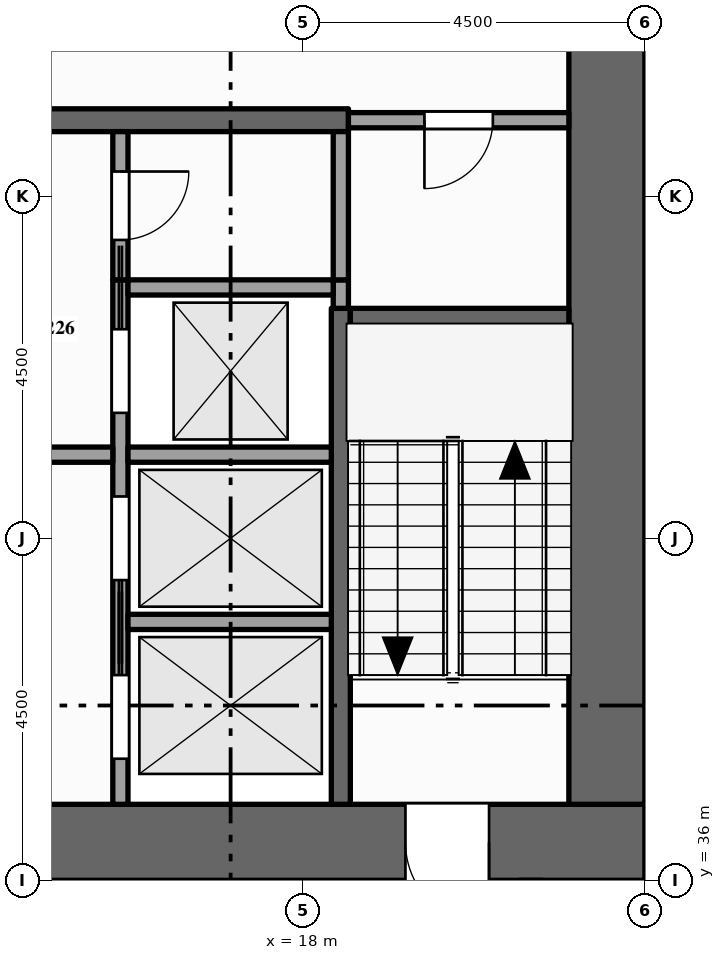
"""IFC4 building model, lengths in metres.
Left out: names, types, materials, properties, quantities, classifications, styles, units other than length and angle.
Written with IfcOpenShell. Run it as: python <this file> out.ifc"""

import sys

from ifc_helpers import new_model, si_unit, direction, frame, frame_2d, origin, place, context, subcontext, project, spatial, rectangle, extrude, element, fill, save


model = new_model("IFC4")
c1 = context("Model", 3, precision=1e-05, world=origin(), true_north=direction((0.0, 1.0)))
c2 = subcontext(c1, "Body", "Model", "MODEL_VIEW")
j1 = project(units=[si_unit("LENGTHUNIT", "METRE"), si_unit("PLANEANGLEUNIT", "RADIAN")], contexts=[c1])
p1 = place(None, origin())
s1 = spatial("IfcSite", under=j1, at=p1, CompositionType="ELEMENT")
p2 = place(p1, origin())
s2 = spatial("IfcBuilding", under=s1, at=p2, CompositionType="ELEMENT")
p3 = place(p2, frame((0.0, 0.0, 143.0)))
s3 = spatial("IfcBuildingStorey", under=s2, at=p3, CompositionType="ELEMENT", Elevation=143.0)
p4 = place(p3, frame((0.0, 36.5, -0.15), z_axis=(0.0, 0.0, 1.0), x_axis=(1.0, 0.0, 0.0)))
e1 = element("IfcWall", 1, at=p4, inside=s3, PredefinedType="SHEAR", context=c2, shape_type="SweptSolid", body=[
    extrude(rectangle(XDim=22.5, YDim=1.0, at=frame_2d((11.25, 0.0))), origin(), (0.0, 0.0, 1.0), 4.0),
])
p5 = place(p4, frame((7.1, 0.0, 0.15)))
e2 = element("IfcOpeningElement", 2, at=p5, cuts=e1, PredefinedType="OPENING", context=c2, shape_type="SweptSolid", body=[
    extrude(rectangle(XDim=1.8, YDim=2.1, at=frame_2d((0.9, 1.05))), frame((0.0, 0.51, 0.0), z_axis=(0.0, -1.0, 0.0), x_axis=(1.0, 0.0, 0.0)), (0.0, 0.0, 1.0), 1.02),
])
p6 = place(p4, frame((13.15, 0.0, 0.15)))
e3 = element("IfcOpeningElement", 3, at=p6, cuts=e1, PredefinedType="OPENING", context=c2, shape_type="SweptSolid", body=[
    extrude(rectangle(XDim=1.1, YDim=2.1, at=frame_2d((0.55, 1.05))), frame((0.0, 0.51, 0.0), z_axis=(0.0, -1.0, 0.0), x_axis=(1.0, 0.0, 0.0)), (0.0, 0.0, 1.0), 1.02),
])
p7 = place(p4, frame((2.15, 0.0, 0.15)))
e4 = element("IfcOpeningElement", 4, at=p7, cuts=e1, PredefinedType="OPENING", context=c2, shape_type="SweptSolid", body=[
    extrude(rectangle(XDim=1.1, YDim=2.1, at=frame_2d((0.55, 1.05))), frame((0.0, 0.51, 0.0), z_axis=(0.0, -1.0, 0.0), x_axis=(1.0, 0.0, 0.0)), (0.0, 0.0, 1.0), 1.02),
])
p8 = place(p4, frame((19.35, 0.0, 0.15)))
e5 = element("IfcOpeningElement", 5, at=p8, cuts=e1, PredefinedType="OPENING", context=c2, shape_type="SweptSolid", body=[
    extrude(rectangle(XDim=1.1, YDim=2.1, at=frame_2d((0.55, 1.05))), frame((0.0, 0.51, 0.0), z_axis=(0.0, -1.0, 0.0), x_axis=(1.0, 0.0, 0.0)), (0.0, 0.0, 1.0), 1.02),
])
p9 = place(p3, frame((22.0, 37.0, -0.15), z_axis=(0.0, 0.0, 1.0), x_axis=(0.0, 1.0, 0.0)))
e6 = element("IfcWall", 6, at=p9, inside=s3, PredefinedType="SHEAR", context=c2, shape_type="SweptSolid", body=[
    extrude(rectangle(XDim=11.5, YDim=1.0, at=frame_2d((5.75, 0.0))), origin(), (0.0, 0.0, 1.0), 4.0),
])
p10 = place(p3, frame((15.6, 37.0, 0.0), z_axis=(0.0, 0.0, 1.0), x_axis=(0.0, 1.0, 0.0)))
e7 = element("IfcWall", 7, at=p10, inside=s3, PredefinedType="SOLIDWALL", context=c2, shape_type="SweptSolid", body=[
    extrude(rectangle(XDim=6.9, YDim=0.2, at=frame_2d((3.45, 0.0))), origin(), (0.0, 0.0, 1.0), 3.85),
])
p11 = place(p10, frame((0.6, 0.0, 0.012)))
e8 = element("IfcOpeningElement", 8, at=p11, cuts=e7, PredefinedType="OPENING", context=c2, shape_type="SweptSolid", body=[
    extrude(rectangle(XDim=1.1, YDim=2.1, at=frame_2d((0.55, 1.05))), frame((0.0, 0.11, 0.0), z_axis=(0.0, -1.0, 0.0), x_axis=(1.0, 0.0, 0.0)), (0.0, 0.0, 1.0), 0.22),
])
p12 = place(p10, frame((2.95, 0.0, 0.012)))
e9 = element("IfcOpeningElement", 9, at=p12, cuts=e7, PredefinedType="OPENING", context=c2, shape_type="SweptSolid", body=[
    extrude(rectangle(XDim=1.1, YDim=2.1, at=frame_2d((0.55, 1.05))), frame((0.0, 0.11, 0.0), z_axis=(0.0, -1.0, 0.0), x_axis=(1.0, 0.0, 0.0)), (0.0, 0.0, 1.0), 0.22),
])
p13 = place(p10, frame((5.15, 0.0, 0.012)))
e10 = element("IfcOpeningElement", 10, at=p13, cuts=e7, PredefinedType="OPENING", context=c2, shape_type="SweptSolid", body=[
    extrude(rectangle(XDim=1.1, YDim=2.1, at=frame_2d((0.55, 1.05))), frame((0.0, 0.11, 0.0), z_axis=(0.0, -1.0, 0.0), x_axis=(1.0, 0.0, 0.0)), (0.0, 0.0, 1.0), 0.22),
])
p14 = place(p3, frame((15.6, 43.9, 0.0), z_axis=(0.0, 0.0, 1.0), x_axis=(0.0, 1.0, 0.0)))
e11 = element("IfcWall", 11, at=p14, inside=s3, PredefinedType="PARTITIONING", context=c2, shape_type="SweptSolid", body=[
    extrude(rectangle(XDim=1.95, YDim=0.2, at=frame_2d((0.975, 0.0))), origin(), (0.0, 0.0, 1.0), 3.85),
])
p15 = place(p14, frame((0.525, 0.0, 0.0)))
e12 = element("IfcOpeningElement", 12, at=p15, cuts=e11, PredefinedType="OPENING", context=c2, shape_type="SweptSolid", body=[
    extrude(rectangle(XDim=0.9, YDim=2.1, at=frame_2d((0.45, 1.05))), frame((0.0, 0.11, 0.0), z_axis=(0.0, -1.0, 0.0), x_axis=(1.0, 0.0, 0.0)), (0.0, 0.0, 1.0), 0.22),
])
p16 = place(p3, frame((18.5, 37.0, 0.0), z_axis=(0.0, 0.0, 1.0), x_axis=(0.0, 1.0, 0.0)))
e13 = element("IfcWall", 13, at=p16, inside=s3, PredefinedType="SHEAR", context=c2, shape_type="SweptSolid", body=[
    extrude(rectangle(XDim=6.525, YDim=0.25, at=frame_2d((3.262, 0.0))), origin(), (0.0, 0.0, 1.0), 3.85),
])
p17 = place(p3, frame((18.5, 43.525, 0.0), z_axis=(0.0, 0.0, 1.0), x_axis=(0.0, 1.0, 0.0)))
e14 = element("IfcWall", 14, at=p17, inside=s3, PredefinedType="SOLIDWALL", context=c2, shape_type="SweptSolid", body=[
    extrude(rectangle(XDim=0.375, YDim=0.2, at=frame_2d((0.188, 0.0))), origin(), (0.0, 0.0, 1.0), 3.85),
])
p18 = place(p3, frame((18.5, 43.9, 0.0), z_axis=(0.0, 0.0, 1.0), x_axis=(0.0, 1.0, 0.0)))
e15 = element("IfcWall", 15, at=p18, inside=s3, PredefinedType="PARTITIONING", context=c2, shape_type="SweptSolid", body=[
    extrude(rectangle(XDim=1.95, YDim=0.2, at=frame_2d((0.975, 0.0))), origin(), (0.0, 0.0, 1.0), 3.85),
])
p19 = place(p3, frame((15.7, 39.4, 0.0), z_axis=(0.0, 0.0, 1.0), x_axis=(1.0, 0.0, 0.0)))
e16 = element("IfcWall", 16, at=p19, inside=s3, PredefinedType="SOLIDWALL", context=c2, shape_type="SweptSolid", body=[
    extrude(rectangle(XDim=2.675, YDim=0.2, at=frame_2d((1.337, 0.0))), origin(), (0.0, 0.0, 1.0), 3.85),
])
p20 = place(p3, frame((11.9, 41.6, 0.0), z_axis=(0.0, 0.0, 1.0), x_axis=(1.0, 0.0, 0.0)))
e17 = element("IfcWall", 17, at=p20, inside=s3, PredefinedType="PARTITIONING", context=c2, shape_type="SweptSolid", body=[
    extrude(rectangle(XDim=3.6, YDim=0.2, at=frame_2d((1.8, 0.0))), origin(), (0.0, 0.0, 1.0), 3.85),
])
p21 = place(p20, frame((1.3, 0.0, 0.0)))
e18 = element("IfcOpeningElement", 18, at=p21, cuts=e17, PredefinedType="OPENING", context=c2, shape_type="SweptSolid", body=[
    extrude(rectangle(XDim=1.0, YDim=2.1, at=frame_2d((0.5, 1.05))), frame((0.0, 0.11, 0.0), z_axis=(0.0, -1.0, 0.0), x_axis=(1.0, 0.0, 0.0)), (0.0, 0.0, 1.0), 0.22),
])
p22 = place(p3, frame((15.7, 41.6, 0.0), z_axis=(0.0, 0.0, 1.0), x_axis=(1.0, 0.0, 0.0)))
e19 = element("IfcWall", 19, at=p22, inside=s3, PredefinedType="SOLIDWALL", context=c2, shape_type="SweptSolid", body=[
    extrude(rectangle(XDim=2.675, YDim=0.2, at=frame_2d((1.337, 0.0))), origin(), (0.0, 0.0, 1.0), 3.85),
])
p23 = place(p3, frame((18.625, 43.4, 0.0), z_axis=(0.0, 0.0, 1.0), x_axis=(1.0, 0.0, 0.0)))
e20 = element("IfcWall", 20, at=p23, inside=s3, PredefinedType="SHEAR", context=c2, shape_type="SweptSolid", body=[
    extrude(rectangle(XDim=2.875, YDim=0.25, at=frame_2d((1.438, 0.0))), origin(), (0.0, 0.0, 1.0), 3.85),
])
p24 = place(p3, frame((15.7, 43.8, 0.0), z_axis=(0.0, 0.0, 1.0), x_axis=(1.0, 0.0, 0.0)))
e21 = element("IfcWall", 21, at=p24, inside=s3, PredefinedType="SOLIDWALL", context=c2, shape_type="SweptSolid", body=[
    extrude(rectangle(XDim=2.7, YDim=0.2, at=frame_2d((1.35, 0.0))), origin(), (0.0, 0.0, 1.0), 3.85),
])
p25 = place(p3, frame((4.1, 46.0, 0.0), z_axis=(0.0, 0.0, 1.0), x_axis=(1.0, 0.0, 0.0)))
e22 = element("IfcWall", 22, at=p25, inside=s3, PredefinedType="SHEAR", context=c2, shape_type="SweptSolid", body=[
    extrude(rectangle(XDim=14.5, YDim=0.3, at=frame_2d((7.25, 0.0))), origin(), (0.0, 0.0, 1.0), 3.85),
])
p26 = place(p25, frame((3.4, 0.0, 0.0)))
e23 = element("IfcOpeningElement", 23, at=p26, cuts=e22, PredefinedType="OPENING", context=c2, shape_type="SweptSolid", body=[
    extrude(rectangle(XDim=1.0, YDim=2.1, at=frame_2d((0.5, 1.05))), frame((0.0, 0.16, 0.0), z_axis=(0.0, -1.0, 0.0), x_axis=(1.0, 0.0, 0.0)), (0.0, 0.0, 1.0), 0.32),
])
p27 = place(p25, frame((9.1, 0.0, 0.0)))
e24 = element("IfcOpeningElement", 24, at=p27, cuts=e22, PredefinedType="OPENING", context=c2, shape_type="SweptSolid", body=[
    extrude(rectangle(XDim=1.0, YDim=2.1, at=frame_2d((0.5, 1.05))), frame((0.0, 0.16, 0.0), z_axis=(0.0, -1.0, 0.0), x_axis=(1.0, 0.0, 0.0)), (0.0, 0.0, 1.0), 0.32),
])
p28 = place(p3, frame((18.6, 46.0, 0.0), z_axis=(0.0, 0.0, 1.0), x_axis=(1.0, 0.0, 0.0)))
e25 = element("IfcWall", 25, at=p28, inside=s3, PredefinedType="PARTITIONING", context=c2, shape_type="SweptSolid", body=[
    extrude(rectangle(XDim=2.9, YDim=0.2, at=frame_2d((1.45, 0.0))), origin(), (0.0, 0.0, 1.0), 3.85),
])
p29 = place(p28, frame((1.0, 0.0, 0.0)))
e26 = element("IfcOpeningElement", 26, at=p29, cuts=e25, PredefinedType="OPENING", context=c2, shape_type="SweptSolid", body=[
    extrude(rectangle(XDim=0.9, YDim=2.1, at=frame_2d((0.45, 1.05))), frame((0.0, 0.11, 0.0), z_axis=(0.0, -1.0, 0.0), x_axis=(1.0, 0.0, 0.0)), (0.0, 0.0, 1.0), 0.22),
])
p30 = place(p11, origin())
e27 = element("IfcDoor", 27, at=p30, inside=s3, OperationType="SLIDING_TO_RIGHT", PredefinedType="DOOR", context=c2, shape_type="SweptSolid", body=[
    extrude(rectangle(XDim=1.1, YDim=2.1, at=frame_2d((0.55, 1.05))), frame((0.0, 0.025, 0.0), z_axis=(0.0, -1.0, 0.0), x_axis=(1.0, 0.0, 0.0)), (0.0, 0.0, 1.0), 0.05),
])
fill(e8, e27)
p31 = place(p12, origin())
e28 = element("IfcDoor", 28, at=p31, inside=s3, OperationType="SLIDING_TO_LEFT", PredefinedType="DOOR", context=c2, shape_type="SweptSolid", body=[
    extrude(rectangle(XDim=1.1, YDim=2.1, at=frame_2d((0.55, 1.05))), frame((0.0, 0.025, 0.0), z_axis=(0.0, -1.0, 0.0), x_axis=(1.0, 0.0, 0.0)), (0.0, 0.0, 1.0), 0.05),
])
fill(e9, e28)
p32 = place(p13, origin())
e29 = element("IfcDoor", 29, at=p32, inside=s3, OperationType="SLIDING_TO_RIGHT", PredefinedType="DOOR", context=c2, shape_type="SweptSolid", body=[
    extrude(rectangle(XDim=1.1, YDim=2.1, at=frame_2d((0.55, 1.05))), frame((0.0, 0.025, 0.0), z_axis=(0.0, -1.0, 0.0), x_axis=(1.0, 0.0, 0.0)), (0.0, 0.0, 1.0), 0.05),
])
fill(e10, e29)
p33 = place(p8, origin())
e30 = element("IfcDoor", 30, at=p33, inside=s3, OperationType="SINGLE_SWING_RIGHT", PredefinedType="DOOR", context=c2, shape_type="SweptSolid", body=[
    extrude(rectangle(XDim=1.1, YDim=2.1, at=frame_2d((0.55, 1.05))), frame((0.0, 0.025, 0.0), z_axis=(0.0, -1.0, 0.0), x_axis=(1.0, 0.0, 0.0)), (0.0, 0.0, 1.0), 0.05),
])
fill(e5, e30)
p34 = place(p29, origin())
e31 = element("IfcDoor", 31, at=p34, inside=s3, OperationType="SINGLE_SWING_LEFT", PredefinedType="DOOR", context=c2, shape_type="SweptSolid", body=[
    extrude(rectangle(XDim=0.9, YDim=2.1, at=frame_2d((0.45, 1.05))), frame((0.0, 0.025, 0.0), z_axis=(0.0, -1.0, 0.0), x_axis=(1.0, 0.0, 0.0)), (0.0, 0.0, 1.0), 0.05),
])
fill(e26, e31)
p35 = place(p15, origin())
e32 = element("IfcDoor", 32, at=p35, inside=s3, OperationType="SINGLE_SWING_RIGHT", PredefinedType="DOOR", context=c2, shape_type="SweptSolid", body=[
    extrude(rectangle(XDim=0.9, YDim=2.1, at=frame_2d((0.45, 1.05))), frame((0.0, 0.025, 0.0), z_axis=(0.0, -1.0, 0.0), x_axis=(1.0, 0.0, 0.0)), (0.0, 0.0, 1.0), 0.05),
])
fill(e12, e32)
save(model, sys.argv[1])
